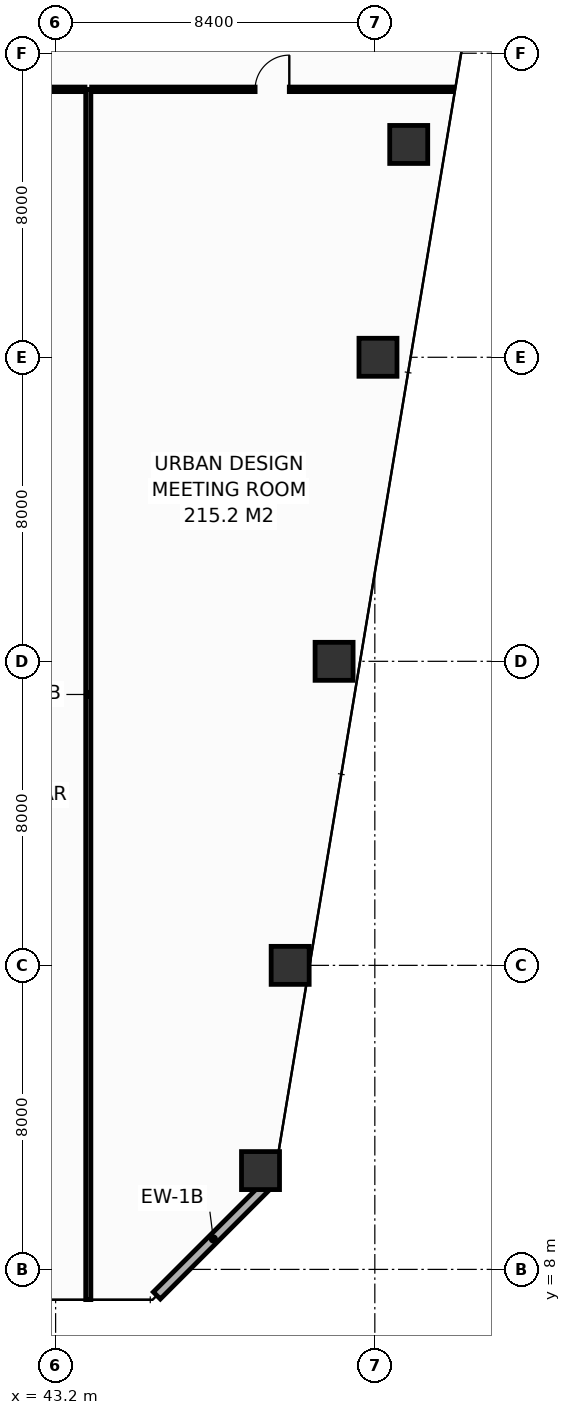
"""IFC4 building model, lengths in metres.
Left out: names, types, materials, properties, quantities, classifications, styles, units other than length and angle.
Written with IfcOpenShell. Run it as: python <this file> out.ifc"""

import sys

from ifc_helpers import new_model, si_unit, direction, frame, frame_2d, origin, origin_2d, place, context, subcontext, project, spatial, rectangle, hollow_rectangle, extrude, element, fill, save


model = new_model("IFC4")
c1 = context("Model", 3, precision=1e-05, world=origin(), true_north=direction((0.0, 1.0)))
c2 = subcontext(c1, "Body", "Model", "MODEL_VIEW")
j1 = project(units=[si_unit("LENGTHUNIT", "METRE"), si_unit("PLANEANGLEUNIT", "RADIAN")], contexts=[c1])
p1 = place(None, origin())
s1 = spatial("IfcSite", under=j1, at=p1, CompositionType="ELEMENT")
p2 = place(p1, origin())
s2 = spatial("IfcBuilding", under=s1, at=p2, CompositionType="ELEMENT")
p3 = place(p2, frame((0.0, 0.0, 160.0)))
s3 = spatial("IfcBuildingStorey", under=s2, at=p3, CompositionType="ELEMENT", Elevation=160.0)
for number, where, z_axis, x_axis in (
    (1, (48.592, 10.6, 0.0), (0.0, 0.0, 1.0), (1.0, 0.0, 0.0)),
    (2, (49.372, 16.0, 0.0), (0.0, 0.0, 1.0), (1.0, 0.0, 0.0)),
    (3, (50.528, 24.0, 0.0), (0.0, 0.0, 1.0), (1.0, 0.0, 0.0)),
    (4, (51.683, 32.0, 0.0), (0.0, 0.0, 1.0), (1.0, 0.0, 0.0)),
    (5, (52.492, 37.6, 0.0), (0.0, 0.0, 1.0), (1.0, 0.0, 0.0)),
):
    element("IfcColumn", number, at=place(p3, frame(where, z_axis=z_axis, x_axis=x_axis)), inside=s3, PredefinedType="COLUMN", context=c2, shape_type="SweptSolid", body=[
        extrude(hollow_rectangle(XDim=1.0, YDim=1.0, WallThickness=0.045, at=origin_2d()), origin(), (0.0, 0.0, 1.0), 3.8),
    ])
p4 = place(p3, frame((45.864, 7.313, 0.0), z_axis=(0.0, 0.0, 1.0), x_axis=(0.70707775441, 0.707135806771, 0.0)))
e6 = element("IfcWall", 6, at=p4, inside=s3, PredefinedType="STANDARD", context=c2, shape_type="SweptSolid", body=[
    extrude(rectangle(XDim=4.206, YDim=0.26, at=frame_2d((2.103, 0.0))), origin(), (0.0, 0.0, 1.0), 3.55),
])
p5 = place(p3, frame((44.06, 7.205, 0.0), z_axis=(0.0, 0.0, 1.0), x_axis=(0.0, 1.0, 0.0)))
e7 = element("IfcWall", 7, at=p5, inside=s3, PredefinedType="PARTITIONING", context=c2, shape_type="SweptSolid", body=[
    extrude(rectangle(XDim=31.845, YDim=0.135, at=frame_2d((15.922, 0.0))), origin(), (0.0, 0.0, 1.0), 2.835),
])
p6 = place(p3, frame((36.15, 39.05, 0.0), z_axis=(0.0, 0.0, 1.0), x_axis=(1.0, 0.0, 0.0)))
e8 = element("IfcWall", 8, at=p6, inside=s3, PredefinedType="PARTITIONING", context=c2, shape_type="SweptSolid", body=[
    extrude(rectangle(XDim=7.823, YDim=0.12, at=frame_2d((3.911, 0.0))), origin(), (0.0, 0.0, 1.0), 2.835),
])
p7 = place(p6, frame((3.461, 0.0, 0.0)))
e9 = element("IfcOpeningElement", 9, at=p7, cuts=e8, PredefinedType="OPENING", context=c2, shape_type="SweptSolid", body=[
    extrude(rectangle(XDim=0.9, YDim=2.1, at=frame_2d((0.45, 1.05))), frame((0.0, 0.07, 0.0), z_axis=(0.0, -1.0, 0.0), x_axis=(1.0, 0.0, 0.0)), (0.0, 0.0, 1.0), 0.14),
])
p8 = place(p3, frame((44.147, 39.05, 0.0), z_axis=(0.0, 0.0, 1.0), x_axis=(1.0, 0.0, 0.0)))
e10 = element("IfcWall", 10, at=p8, inside=s3, PredefinedType="PARTITIONING", context=c2, shape_type="SweptSolid", body=[
    extrude(rectangle(XDim=9.504, YDim=0.12, at=frame_2d((4.752, 0.0))), origin(), (0.0, 0.0, 1.0), 3.035),
])
p9 = place(p8, frame((4.302, 0.0, 0.0)))
e11 = element("IfcOpeningElement", 11, at=p9, cuts=e10, PredefinedType="OPENING", context=c2, shape_type="SweptSolid", body=[
    extrude(rectangle(XDim=0.9, YDim=2.1, at=frame_2d((0.45, 1.05))), frame((0.0, 0.07, 0.0), z_axis=(0.0, -1.0, 0.0), x_axis=(1.0, 0.0, 0.0)), (0.0, 0.0, 1.0), 0.14),
])
p10 = place(p9, origin())
e12 = element("IfcDoor", 12, at=p10, inside=s3, OperationType="SINGLE_SWING_RIGHT", PredefinedType="DOOR", context=c2, shape_type="SweptSolid", body=[
    extrude(rectangle(XDim=0.9, YDim=2.1, at=frame_2d((0.45, 1.05))), frame((0.0, 0.025, 0.0), z_axis=(0.0, -1.0, 0.0), x_axis=(1.0, 0.0, 0.0)), (0.0, 0.0, 1.0), 0.05),
])
fill(e11, e12)
save(model, sys.argv[1])
